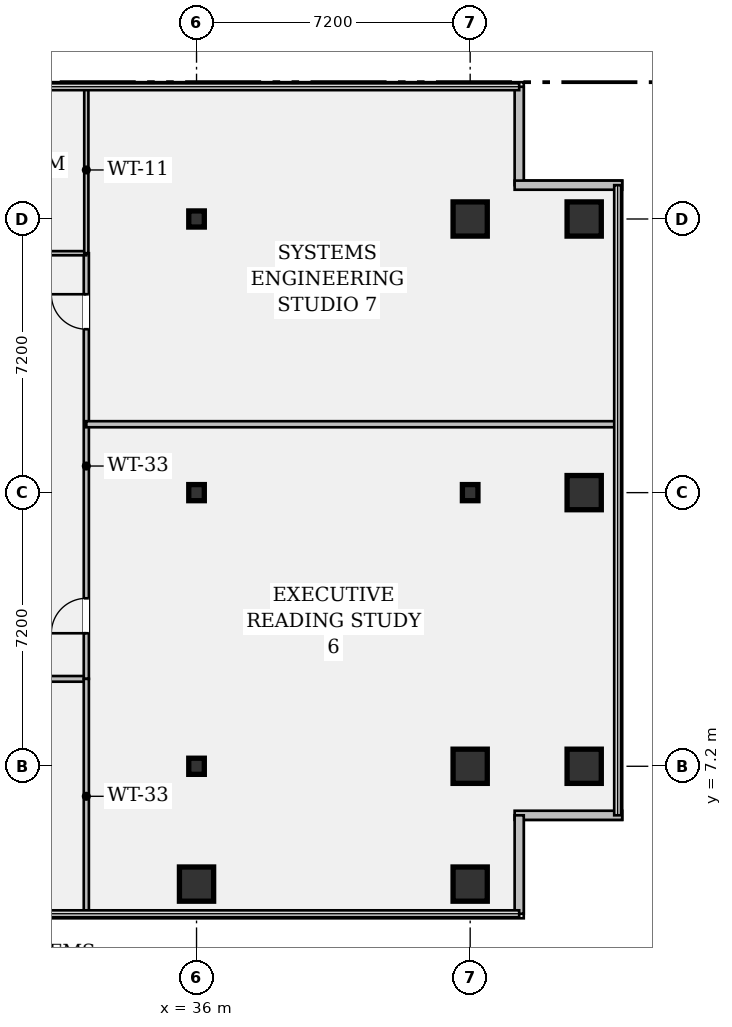
"""IFC4 building model, lengths in metres.
Left out: names, types, materials, properties, quantities, classifications, styles, units other than length and angle.
Written with IfcOpenShell. Run it as: python <this file> out.ifc"""

import sys

from ifc_helpers import new_model, si_unit, direction, frame, frame_2d, origin, origin_2d, place, context, subcontext, project, spatial, rectangle, hollow_rectangle, i_section, extrude, element, fill, save


model = new_model("IFC4")
c1 = context("Model", 3, precision=1e-05, world=origin(), true_north=direction((0.0, 1.0)))
c2 = subcontext(c1, "Body", "Model", "MODEL_VIEW")
j1 = project(units=[si_unit("LENGTHUNIT", "METRE"), si_unit("PLANEANGLEUNIT", "RADIAN")], contexts=[c1])
p1 = place(None, origin())
s1 = spatial("IfcSite", under=j1, at=p1, CompositionType="ELEMENT")
p2 = place(p1, origin())
s2 = spatial("IfcBuilding", under=s1, at=p2, CompositionType="ELEMENT")
p3 = place(p2, frame((0.0, 0.0, 140.7)))
s3 = spatial("IfcBuildingStorey", under=s2, at=p3, CompositionType="ELEMENT", Elevation=140.7)
p4 = place(p3, frame((36.0, 4.1, 0.0), z_axis=(0.0, 0.0, 1.0), x_axis=(1.0, 0.0, 0.0)))
e1 = element("IfcColumn", 1, at=p4, inside=s3, PredefinedType="COLUMN", context=c2, shape_type="SweptSolid", body=[
    extrude(hollow_rectangle(XDim=0.9, YDim=0.9, WallThickness=0.055, at=origin_2d()), origin(), (0.0, 0.0, 1.0), 3.58),
])
for number, where, z_axis, x_axis in (
    (2, (36.0, 7.2, 0.0), (0.0, 0.0, 1.0), (1.0, 0.0, 0.0)),
    (3, (36.0, 14.4, 0.0), (0.0, 0.0, 1.0), (1.0, 0.0, 0.0)),
    (4, (36.0, 21.6, 0.0), (0.0, 0.0, 1.0), (1.0, 0.0, 0.0)),
):
    element("IfcColumn", number, at=place(p3, frame(where, z_axis=z_axis, x_axis=x_axis)), inside=s3, PredefinedType="COLUMN", context=c2, shape_type="SweptSolid", body=[
        extrude(i_section(OverallWidth=0.409, OverallDepth=0.424, WebThickness=0.033, FlangeThickness=0.052, FilletRadius=0.018, at=origin_2d()), origin(), (0.0, 0.0, 1.0), 3.58),
    ])
for number, where, z_axis, x_axis in (
    (5, (43.2, 4.1, 0.0), (0.0, 0.0, 1.0), (1.0, 0.0, 0.0)),
    (6, (43.2, 7.2, 0.0), (0.0, 0.0, 1.0), (1.0, 0.0, 0.0)),
):
    element("IfcColumn", number, at=place(p3, frame(where, z_axis=z_axis, x_axis=x_axis)), inside=s3, PredefinedType="COLUMN", context=c2, shape_type="SweptSolid", body=[
        extrude(hollow_rectangle(XDim=0.9, YDim=0.9, WallThickness=0.055, at=origin_2d()), origin(), (0.0, 0.0, 1.0), 3.58),
    ])
p5 = place(p3, frame((43.2, 14.4, 0.0), z_axis=(0.0, 0.0, 1.0), x_axis=(1.0, 0.0, 0.0)))
e7 = element("IfcColumn", 7, at=p5, inside=s3, PredefinedType="COLUMN", context=c2, shape_type="SweptSolid", body=[
    extrude(i_section(OverallWidth=0.409, OverallDepth=0.424, WebThickness=0.033, FlangeThickness=0.052, FilletRadius=0.018, at=origin_2d()), origin(), (0.0, 0.0, 1.0), 3.58),
])
for number, where, z_axis, x_axis in (
    (8, (43.2, 21.6, 0.0), (0.0, 0.0, 1.0), (1.0, 0.0, 0.0)),
    (9, (46.2, 7.2, 0.0), (0.0, 0.0, 1.0), (1.0, 0.0, 0.0)),
    (10, (46.2, 14.4, 0.0), (0.0, 0.0, 1.0), (1.0, 0.0, 0.0)),
    (11, (46.2, 21.6, 0.0), (0.0, 0.0, 1.0), (1.0, 0.0, 0.0)),
):
    element("IfcColumn", number, at=place(p3, frame(where, z_axis=z_axis, x_axis=x_axis)), inside=s3, PredefinedType="COLUMN", context=c2, shape_type="SweptSolid", body=[
        extrude(hollow_rectangle(XDim=0.9, YDim=0.9, WallThickness=0.055, at=origin_2d()), origin(), (0.0, 0.0, 1.0), 3.58),
    ])
p6 = place(p3, frame((44.49, 25.08, 0.0), z_axis=(0.0, 0.0, 1.0), x_axis=(0.0, -1.0, 0.0)))
e12 = element("IfcWall", 12, at=p6, inside=s3, PredefinedType="STANDARD", context=c2, shape_type="SweptSolid", body=[
    extrude(rectangle(XDim=2.59, YDim=0.24, at=frame_2d((1.295, 0.0))), origin(), (0.0, 0.0, 1.0), 3.58),
])
for number, where, z_axis, x_axis in (
    (13, (44.37, 22.49, 0.0), (0.0, 0.0, 1.0), (1.0, 0.0, 0.0)),
    (14, (47.2, 5.91, 0.0), (0.0, 0.0, 1.0), (-1.0, 0.0, 0.0)),
):
    element("IfcWall", number, at=place(p3, frame(where, z_axis=z_axis, x_axis=x_axis)), inside=s3, PredefinedType="STANDARD", context=c2, shape_type="SweptSolid", body=[
        extrude(rectangle(XDim=2.83, YDim=0.24, at=frame_2d((1.415, 0.0))), origin(), (0.0, 0.0, 1.0), 3.58),
    ])
p7 = place(p3, frame((44.49, 5.91, 0.0), z_axis=(0.0, 0.0, 1.0), x_axis=(0.0, -1.0, 0.0)))
e15 = element("IfcWall", 15, at=p7, inside=s3, PredefinedType="STANDARD", context=c2, shape_type="SweptSolid", body=[
    extrude(rectangle(XDim=2.59, YDim=0.24, at=frame_2d((1.295, 0.0))), origin(), (0.0, 0.0, 1.0), 3.58),
])
p8 = place(p3, frame((17.35, 9.5, 0.0), z_axis=(0.0, 0.0, 1.0), x_axis=(1.0, 0.0, 0.0)))
e16 = element("IfcWall", 16, at=p8, inside=s3, PredefinedType="PARTITIONING", context=c2, shape_type="SweptSolid", body=[
    extrude(rectangle(XDim=15.75, YDim=0.15, at=frame_2d((7.875, 0.0))), origin(), (0.0, 0.0, 1.0), 2.869),
])
p9 = place(p8, frame((3.73, 0.0, 0.0)))
e17 = element("IfcOpeningElement", 17, at=p9, cuts=e16, PredefinedType="OPENING", context=c2, shape_type="SweptSolid", body=[
    extrude(rectangle(XDim=0.92, YDim=2.15, at=frame_2d((0.46, 1.075))), frame((0.0, 0.087, 0.0), z_axis=(0.0, -1.0, 0.0), x_axis=(1.0, 0.0, 0.0)), (0.0, 0.0, 1.0), 0.174),
])
p10 = place(p8, frame((11.6, 0.0, 0.0)))
e18 = element("IfcOpeningElement", 18, at=p10, cuts=e16, PredefinedType="OPENING", context=c2, shape_type="SweptSolid", body=[
    extrude(rectangle(XDim=0.92, YDim=2.15, at=frame_2d((0.46, 1.075))), frame((0.0, 0.087, 0.0), z_axis=(0.0, -1.0, 0.0), x_axis=(1.0, 0.0, 0.0)), (0.0, 0.0, 1.0), 0.174),
])
p11 = place(p3, frame((33.1, 9.5, 0.0), z_axis=(0.0, 0.0, 1.0), x_axis=(0.0, 1.0, 0.0)))
e19 = element("IfcWall", 19, at=p11, inside=s3, PredefinedType="PARTITIONING", context=c2, shape_type="SweptSolid", body=[
    extrude(rectangle(XDim=11.2, YDim=0.135, at=frame_2d((5.6, 0.0))), origin(), (0.0, 0.0, 1.0), 2.869),
])
p12 = place(p11, frame((1.2, 0.0, 0.0)))
e20 = element("IfcOpeningElement", 20, at=p12, cuts=e19, PredefinedType="OPENING", context=c2, shape_type="SweptSolid", body=[
    extrude(rectangle(XDim=0.92, YDim=2.15, at=frame_2d((0.46, 1.075))), frame((0.0, 0.08, 0.0), z_axis=(0.0, -1.0, 0.0), x_axis=(1.0, 0.0, 0.0)), (0.0, 0.0, 1.0), 0.159),
])
p13 = place(p11, frame((9.2, 0.0, 0.0)))
e21 = element("IfcOpeningElement", 21, at=p13, cuts=e19, PredefinedType="OPENING", context=c2, shape_type="SweptSolid", body=[
    extrude(rectangle(XDim=0.92, YDim=2.15, at=frame_2d((0.46, 1.075))), frame((0.0, 0.08, 0.0), z_axis=(0.0, -1.0, 0.0), x_axis=(1.0, 0.0, 0.0)), (0.0, 0.0, 1.0), 0.159),
])
p14 = place(p3, frame((17.35, 20.7, 0.0), z_axis=(0.0, 0.0, 1.0), x_axis=(1.0, 0.0, 0.0)))
e22 = element("IfcWall", 22, at=p14, inside=s3, PredefinedType="PARTITIONING", context=c2, shape_type="SweptSolid", body=[
    extrude(rectangle(XDim=15.75, YDim=0.11, at=frame_2d((7.875, 0.0))), origin(), (0.0, 0.0, 1.0), 2.869),
])
p15 = place(p14, frame((0.85, 0.0, 0.0)))
e23 = element("IfcOpeningElement", 23, at=p15, cuts=e22, PredefinedType="OPENING", context=c2, shape_type="SweptSolid", body=[
    extrude(rectangle(XDim=0.85, YDim=2.15, at=frame_2d((0.425, 1.075))), frame((0.0, 0.067, 0.0), z_axis=(0.0, -1.0, 0.0), x_axis=(1.0, 0.0, 0.0)), (0.0, 0.0, 1.0), 0.134),
])
p16 = place(p14, frame((4.75, 0.0, 0.0)))
e24 = element("IfcOpeningElement", 24, at=p16, cuts=e22, PredefinedType="OPENING", context=c2, shape_type="SweptSolid", body=[
    extrude(rectangle(XDim=0.85, YDim=2.15, at=frame_2d((0.425, 1.075))), frame((0.0, 0.067, 0.0), z_axis=(0.0, -1.0, 0.0), x_axis=(1.0, 0.0, 0.0)), (0.0, 0.0, 1.0), 0.134),
])
p17 = place(p14, frame((6.81, 0.0, 0.0)))
e25 = element("IfcOpeningElement", 25, at=p17, cuts=e22, PredefinedType="OPENING", context=c2, shape_type="SweptSolid", body=[
    extrude(rectangle(XDim=0.85, YDim=2.15, at=frame_2d((0.425, 1.075))), frame((0.0, 0.067, 0.0), z_axis=(0.0, -1.0, 0.0), x_axis=(1.0, 0.0, 0.0)), (0.0, 0.0, 1.0), 0.134),
])
p18 = place(p14, frame((9.21, 0.0, 0.0)))
e26 = element("IfcOpeningElement", 26, at=p18, cuts=e22, PredefinedType="OPENING", context=c2, shape_type="SweptSolid", body=[
    extrude(rectangle(XDim=0.92, YDim=2.15, at=frame_2d((0.46, 1.075))), frame((0.0, 0.067, 0.0), z_axis=(0.0, -1.0, 0.0), x_axis=(1.0, 0.0, 0.0)), (0.0, 0.0, 1.0), 0.134),
])
p19 = place(p3, frame((33.1, 3.32, 0.0), z_axis=(0.0, 0.0, 1.0), x_axis=(0.0, 1.0, 0.0)))
e27 = element("IfcWall", 27, at=p19, inside=s3, PredefinedType="PARTITIONING", context=c2, shape_type="SweptSolid", body=[
    extrude(rectangle(XDim=6.18, YDim=0.135, at=frame_2d((3.09, 0.0))), origin(), (0.0, 0.0, 1.0), 2.869),
])
p20 = place(p3, frame((33.1, 20.7, 0.0), z_axis=(0.0, 0.0, 1.0), x_axis=(0.0, 1.0, 0.0)))
e28 = element("IfcWall", 28, at=p20, inside=s3, PredefinedType="PARTITIONING", context=c2, shape_type="SweptSolid", body=[
    extrude(rectangle(XDim=4.38, YDim=0.11, at=frame_2d((2.19, 0.0))), origin(), (0.0, 0.0, 1.0), 2.869),
])
p21 = place(p3, frame((33.1, 16.2, 0.0), z_axis=(0.0, 0.0, 1.0), x_axis=(1.0, 0.0, 0.0)))
e29 = element("IfcWall", 29, at=p21, inside=s3, PredefinedType="PARTITIONING", context=c2, shape_type="SweptSolid", body=[
    extrude(rectangle(XDim=13.98, YDim=0.16, at=frame_2d((6.99, 0.0))), origin(), (0.0, 0.0, 1.0), 2.869),
])
p22 = place(p12, origin())
e30 = element("IfcDoor", 30, at=p22, inside=s3, OperationType="SINGLE_SWING_LEFT", PredefinedType="DOOR", context=c2, shape_type="SweptSolid", body=[
    extrude(rectangle(XDim=0.92, YDim=2.15, at=frame_2d((0.46, 1.075))), frame((0.0, 0.025, 0.0), z_axis=(0.0, -1.0, 0.0), x_axis=(1.0, 0.0, 0.0)), (0.0, 0.0, 1.0), 0.05),
])
fill(e20, e30)
p23 = place(p13, origin())
e31 = element("IfcDoor", 31, at=p23, inside=s3, OperationType="SINGLE_SWING_RIGHT", PredefinedType="DOOR", context=c2, shape_type="SweptSolid", body=[
    extrude(rectangle(XDim=0.92, YDim=2.15, at=frame_2d((0.46, 1.075))), frame((0.0, 0.025, 0.0), z_axis=(0.0, -1.0, 0.0), x_axis=(1.0, 0.0, 0.0)), (0.0, 0.0, 1.0), 0.05),
])
fill(e21, e31)
save(model, sys.argv[1])
